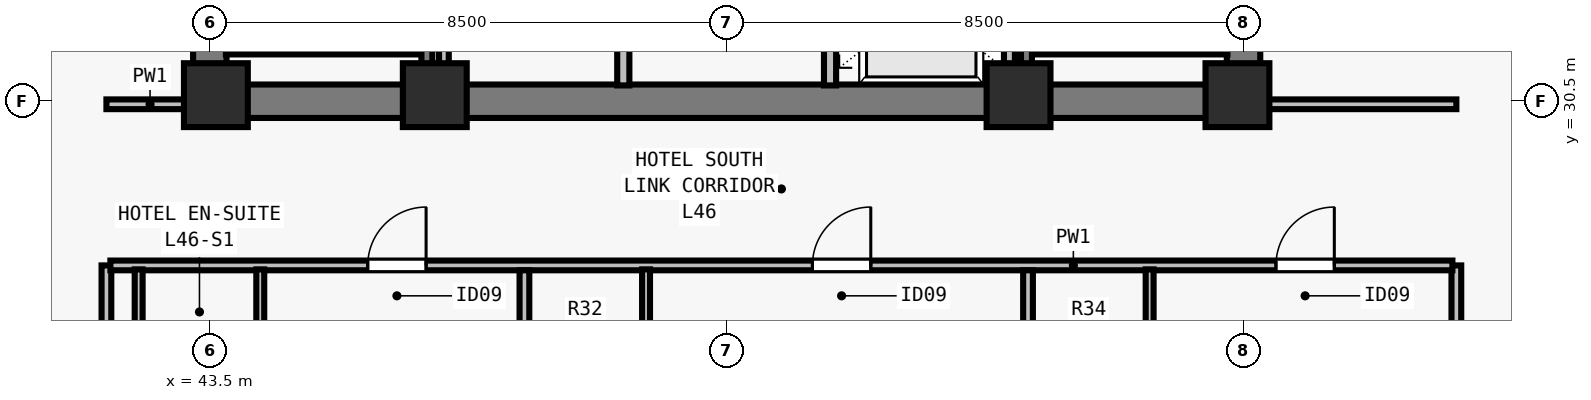
"""IFC4 building model, lengths in metres.
Left out: names, types, materials, properties, quantities, classifications, styles, units other than length and angle.
Written with IfcOpenShell. Run it as: python <this file> out.ifc"""

import sys

from ifc_helpers import new_model, si_unit, direction, frame, frame_2d, origin, origin_2d, place, context, subcontext, project, spatial, rectangle, extrude, element, fill, save


model = new_model("IFC4")
c1 = context("Model", 3, precision=1e-05, world=origin(), true_north=direction((0.0, 1.0)))
c2 = subcontext(c1, "Body", "Model", "MODEL_VIEW")
j1 = project(units=[si_unit("LENGTHUNIT", "METRE"), si_unit("PLANEANGLEUNIT", "RADIAN")], contexts=[c1])
p1 = place(None, origin())
s1 = spatial("IfcSite", under=j1, at=p1, CompositionType="ELEMENT")
p2 = place(p1, origin())
s2 = spatial("IfcBuilding", under=s1, at=p2, CompositionType="ELEMENT")
p3 = place(p2, frame((0.0, 0.0, 169.0)))
s3 = spatial("IfcBuildingStorey", under=s2, at=p3, CompositionType="ELEMENT", Elevation=169.0)
for number, where, z_axis, x_axis in (
    (1, (43.6, 30.6, 0.0), (0.0, 0.0, 1.0), (1.0, 0.0, 0.0)),
    (2, (47.2, 30.6, 0.0), (0.0, 0.0, 1.0), (1.0, 0.0, 0.0)),
    (3, (56.8, 30.6, 0.0), (0.0, 0.0, 1.0), (1.0, 0.0, 0.0)),
    (4, (60.4, 30.6, 0.0), (0.0, 0.0, 1.0), (1.0, 0.0, 0.0)),
):
    element("IfcColumn", number, at=place(p3, frame(where, z_axis=z_axis, x_axis=x_axis)), inside=s3, PredefinedType="COLUMN", context=c2, shape_type="SweptSolid", body=[
        extrude(rectangle(XDim=1.05, YDim=1.05, at=origin_2d()), origin(), (0.0, 0.0, 1.0), 3.5),
    ])
p4 = place(p3, frame((43.225, 30.5, 0.0), z_axis=(0.0, 0.0, 1.0), x_axis=(1.0, 0.0, 0.0)))
e5 = element("IfcWall", 5, at=p4, inside=s3, PredefinedType="SHEAR", context=c2, shape_type="SweptSolid", body=[
    extrude(rectangle(XDim=17.55, YDim=0.55, at=frame_2d((8.775, 0.0))), origin(), (0.0, 0.0, 1.0), 3.28),
])
for number, where, z_axis, x_axis in (
    (6, (43.5, 30.765, 0.0), (0.0, 0.0, 1.0), (0.0, 1.0, 0.0)),
    (7, (60.5, 30.765, 0.0), (0.0, 0.0, 1.0), (0.0, 1.0, 0.0)),
):
    element("IfcWall", number, at=place(p3, frame(where, z_axis=z_axis, x_axis=x_axis)), inside=s3, PredefinedType="SHEAR", context=c2, shape_type="SweptSolid", body=[
        extrude(rectangle(XDim=7.985, YDim=0.55, at=frame_2d((3.993, 0.0))), origin(), (0.0, 0.0, 1.0), 3.28),
    ])
p5 = place(p3, frame((50.3, 30.76, 0.0), z_axis=(0.0, 0.0, 1.0), x_axis=(0.0, 1.0, 0.0)))
e8 = element("IfcWall", 8, at=p5, inside=s3, PredefinedType="SOLIDWALL", context=c2, shape_type="SweptSolid", body=[
    extrude(rectangle(XDim=7.855, YDim=0.2, at=frame_2d((3.927, 0.0))), origin(), (0.0, 0.0, 1.0), 3.28),
])
p6 = place(p5, frame((1.34, 0.0, 0.0)))
e9 = element("IfcOpeningElement", 9, at=p6, cuts=e8, PredefinedType="OPENING", context=c2, shape_type="SweptSolid", body=[
    extrude(rectangle(XDim=0.9, YDim=2.12, at=frame_2d((0.45, 1.06))), frame((0.0, 0.11, 0.0), z_axis=(0.0, -1.0, 0.0), x_axis=(1.0, 0.0, 0.0)), (0.0, 0.0, 1.0), 0.22),
])
p7 = place(p5, frame((5.34, 0.0, 0.0)))
e10 = element("IfcOpeningElement", 10, at=p7, cuts=e8, PredefinedType="OPENING", context=c2, shape_type="SweptSolid", body=[
    extrude(rectangle(XDim=0.9, YDim=2.12, at=frame_2d((0.45, 1.06))), frame((0.0, 0.11, 0.0), z_axis=(0.0, -1.0, 0.0), x_axis=(1.0, 0.0, 0.0)), (0.0, 0.0, 1.0), 0.22),
])
p8 = place(p3, frame((53.7, 30.76, 0.0), z_axis=(0.0, 0.0, 1.0), x_axis=(0.0, 1.0, 0.0)))
e11 = element("IfcWall", 11, at=p8, inside=s3, PredefinedType="SOLIDWALL", context=c2, shape_type="SweptSolid", body=[
    extrude(rectangle(XDim=7.855, YDim=0.2, at=frame_2d((3.927, 0.0))), origin(), (0.0, 0.0, 1.0), 3.28),
])
p9 = place(p8, frame((0.79, 0.0, 0.0)))
e12 = element("IfcOpeningElement", 12, at=p9, cuts=e11, PredefinedType="OPENING", context=c2, shape_type="SweptSolid", body=[
    extrude(rectangle(XDim=1.1, YDim=2.2, at=frame_2d((0.55, 1.1))), frame((0.0, 0.11, 0.0), z_axis=(0.0, -1.0, 0.0), x_axis=(1.0, 0.0, 0.0)), (0.0, 0.0, 1.0), 0.22),
])
p10 = place(p8, frame((3.49, 0.0, 0.0)))
e13 = element("IfcOpeningElement", 13, at=p10, cuts=e11, PredefinedType="OPENING", context=c2, shape_type="SweptSolid", body=[
    extrude(rectangle(XDim=1.1, YDim=2.2, at=frame_2d((0.55, 1.1))), frame((0.0, 0.11, 0.0), z_axis=(0.0, -1.0, 0.0), x_axis=(1.0, 0.0, 0.0)), (0.0, 0.0, 1.0), 0.22),
])
p11 = place(p8, frame((6.19, 0.0, 0.0)))
e14 = element("IfcOpeningElement", 14, at=p11, cuts=e11, PredefinedType="OPENING", context=c2, shape_type="SweptSolid", body=[
    extrude(rectangle(XDim=1.1, YDim=2.2, at=frame_2d((0.55, 1.1))), frame((0.0, 0.11, 0.0), z_axis=(0.0, -1.0, 0.0), x_axis=(1.0, 0.0, 0.0)), (0.0, 0.0, 1.0), 0.22),
])
p12 = place(p3, frame((47.35, 30.76, 0.0), z_axis=(0.0, 0.0, 1.0), x_axis=(0.0, 1.0, 0.0)))
e15 = element("IfcWall", 15, at=p12, inside=s3, PredefinedType="PARTITIONING", context=c2, shape_type="SweptSolid", body=[
    extrude(rectangle(XDim=7.855, YDim=0.16, at=frame_2d((3.927, 0.0))), origin(), (0.0, 0.0, 1.0), 3.28),
])
p13 = place(p3, frame((56.65, 30.76, 0.0), z_axis=(0.0, 0.0, 1.0), x_axis=(0.0, 1.0, 0.0)))
e16 = element("IfcWall", 16, at=p13, inside=s3, PredefinedType="SOLIDWALL", context=c2, shape_type="SweptSolid", body=[
    extrude(rectangle(XDim=7.855, YDim=0.18, at=frame_2d((3.927, 0.0))), origin(), (0.0, 0.0, 1.0), 3.28),
])
p14 = place(p3, frame((41.8, 15.325, 0.0), z_axis=(0.0, 0.0, 1.0), x_axis=(0.0, 1.0, 0.0)))
e17 = element("IfcWall", 17, at=p14, inside=s3, PredefinedType="PARTITIONING", context=c2, shape_type="SweptSolid", body=[
    extrude(rectangle(XDim=12.475, YDim=0.16, at=frame_2d((6.238, 0.0))), origin(), (0.0, 0.0, 1.0), 3.28),
])
p15 = place(p3, frame((41.8, 30.45, 0.0), z_axis=(0.0, 0.0, 1.0), x_axis=(1.0, 0.0, 0.0)))
e18 = element("IfcWall", 18, at=p15, inside=s3, PredefinedType="PARTITIONING", context=c2, shape_type="SweptSolid", body=[
    extrude(rectangle(XDim=1.435, YDim=0.16, at=frame_2d((0.718, 0.0))), origin(), (0.0, 0.0, 1.0), 3.28),
])
p16 = place(p3, frame((64.0, 15.27, 0.0), z_axis=(0.0, 0.0, 1.0), x_axis=(0.0, 1.0, 0.0)))
e19 = element("IfcWall", 19, at=p16, inside=s3, PredefinedType="PARTITIONING", context=c2, shape_type="SweptSolid", body=[
    extrude(rectangle(XDim=12.53, YDim=0.16, at=frame_2d((6.265, 0.0))), origin(), (0.0, 0.0, 1.0), 2.555),
])
p17 = place(p3, frame((60.765, 30.45, 0.0), z_axis=(0.0, 0.0, 1.0), x_axis=(1.0, 0.0, 0.0)))
e20 = element("IfcWall", 20, at=p17, inside=s3, PredefinedType="PARTITIONING", context=c2, shape_type="SweptSolid", body=[
    extrude(rectangle(XDim=3.235, YDim=0.16, at=frame_2d((1.618, 0.0))), origin(), (0.0, 0.0, 1.0), 3.28),
])
p18 = place(p3, frame((41.865, 27.8, 0.0), z_axis=(0.0, 0.0, 1.0), x_axis=(1.0, 0.0, 0.0)))
e21 = element("IfcWall", 21, at=p18, inside=s3, PredefinedType="PARTITIONING", context=c2, shape_type="SweptSolid", body=[
    extrude(rectangle(XDim=22.07, YDim=0.16, at=frame_2d((11.035, 0.0))), origin(), (0.0, 0.0, 1.0), 3.28),
])
p19 = place(p18, frame((4.232, 0.0, 0.0)))
e22 = element("IfcOpeningElement", 22, at=p19, cuts=e21, PredefinedType="OPENING", context=c2, shape_type="SweptSolid", body=[
    extrude(rectangle(XDim=0.96, YDim=2.15, at=frame_2d((0.48, 1.075))), frame((0.0, 0.09, 0.0), z_axis=(0.0, -1.0, 0.0), x_axis=(1.0, 0.0, 0.0)), (0.0, 0.0, 1.0), 0.18),
])
p20 = place(p18, frame((11.545, 0.0, 0.0)))
e23 = element("IfcOpeningElement", 23, at=p20, cuts=e21, PredefinedType="OPENING", context=c2, shape_type="SweptSolid", body=[
    extrude(rectangle(XDim=0.96, YDim=2.15, at=frame_2d((0.48, 1.075))), frame((0.0, 0.09, 0.0), z_axis=(0.0, -1.0, 0.0), x_axis=(1.0, 0.0, 0.0)), (0.0, 0.0, 1.0), 0.18),
])
p21 = place(p18, frame((19.168, 0.0, 0.0)))
e24 = element("IfcOpeningElement", 24, at=p21, cuts=e21, PredefinedType="OPENING", context=c2, shape_type="SweptSolid", body=[
    extrude(rectangle(XDim=0.96, YDim=2.15, at=frame_2d((0.48, 1.075))), frame((0.0, 0.09, 0.0), z_axis=(0.0, -1.0, 0.0), x_axis=(1.0, 0.0, 0.0)), (0.0, 0.0, 1.0), 0.18),
])
for number, where, z_axis, x_axis in (
    (25, (42.33, 25.42, 0.0), (0.0, 0.0, 1.0), (0.0, 1.0, 0.0)),
    (26, (44.33, 25.42, 0.0), (0.0, 0.0, 1.0), (0.0, 1.0, 0.0)),
):
    element("IfcWall", number, at=place(p3, frame(where, z_axis=z_axis, x_axis=x_axis)), inside=s3, PredefinedType="PLUMBINGWALL", context=c2, shape_type="SweptSolid", body=[
        extrude(rectangle(XDim=2.315, YDim=0.13, at=frame_2d((1.158, 0.0))), origin(), (0.0, 0.0, 1.0), 3.28),
    ])
p22 = place(p3, frame((48.674, 15.325, 0.0), z_axis=(0.0, 0.0, 1.0), x_axis=(0.0, 1.0, 0.0)))
e27 = element("IfcWall", 27, at=p22, inside=s3, PredefinedType="PARTITIONING", context=c2, shape_type="SweptSolid", body=[
    extrude(rectangle(XDim=12.395, YDim=0.16, at=frame_2d((6.198, 0.0))), origin(), (0.0, 0.0, 1.0), 2.896),
])
p23 = place(p3, frame((50.674, 25.42, 0.0), z_axis=(0.0, 0.0, 1.0), x_axis=(0.0, 1.0, 0.0)))
e28 = element("IfcWall", 28, at=p23, inside=s3, PredefinedType="PLUMBINGWALL", context=c2, shape_type="SweptSolid", body=[
    extrude(rectangle(XDim=2.315, YDim=0.13, at=frame_2d((1.158, 0.0))), origin(), (0.0, 0.0, 1.0), 3.28),
])
p24 = place(p3, frame((56.956, 15.325, 0.0), z_axis=(0.0, 0.0, 1.0), x_axis=(0.0, 1.0, 0.0)))
e29 = element("IfcWall", 29, at=p24, inside=s3, PredefinedType="PARTITIONING", context=c2, shape_type="SweptSolid", body=[
    extrude(rectangle(XDim=12.395, YDim=0.16, at=frame_2d((6.198, 0.0))), origin(), (0.0, 0.0, 1.0), 2.555),
])
p25 = place(p3, frame((58.956, 25.42, 0.0), z_axis=(0.0, 0.0, 1.0), x_axis=(0.0, 1.0, 0.0)))
e30 = element("IfcWall", 30, at=p25, inside=s3, PredefinedType="PLUMBINGWALL", context=c2, shape_type="SweptSolid", body=[
    extrude(rectangle(XDim=2.315, YDim=0.13, at=frame_2d((1.158, 0.0))), origin(), (0.0, 0.0, 1.0), 3.28),
])
p26 = place(p3, frame((43.765, 31.36, 0.0), z_axis=(0.0, 0.0, 1.0), x_axis=(1.0, 0.0, 0.0)))
e31 = element("IfcWall", 31, at=p26, inside=s3, PredefinedType="SOLIDWALL", context=c2, shape_type="SweptSolid", body=[
    extrude(rectangle(XDim=3.23, YDim=0.18, at=frame_2d((1.615, 0.0))), origin(), (0.0, 0.0, 1.0), 3.28),
])
p27 = place(p3, frame((47.07, 38.78, 0.0), z_axis=(0.0, 0.0, 1.0), x_axis=(0.0, -1.0, 0.0)))
e32 = element("IfcWall", 32, at=p27, inside=s3, PredefinedType="SOLIDWALL", context=c2, shape_type="SweptSolid", body=[
    extrude(rectangle(XDim=8.017, YDim=0.18, at=frame_2d((4.009, 0.0))), origin(), (0.0, 0.0, 1.0), 3.28),
])
p28 = place(p3, frame((57.005, 31.36, 0.0), z_axis=(0.0, 0.0, 1.0), x_axis=(1.0, 0.0, 0.0)))
e33 = element("IfcWall", 33, at=p28, inside=s3, PredefinedType="SOLIDWALL", context=c2, shape_type="SweptSolid", body=[
    extrude(rectangle(XDim=3.23, YDim=0.18, at=frame_2d((1.615, 0.0))), origin(), (0.0, 0.0, 1.0), 3.28),
])
p29 = place(p3, frame((56.93, 38.78, 0.0), z_axis=(0.0, 0.0, 1.0), x_axis=(0.0, -1.0, 0.0)))
e34 = element("IfcWall", 34, at=p29, inside=s3, PredefinedType="SOLIDWALL", context=c2, shape_type="SweptSolid", body=[
    extrude(rectangle(XDim=8.017, YDim=0.18, at=frame_2d((4.009, 0.0))), origin(), (0.0, 0.0, 1.0), 3.28),
])
p30 = place(p19, origin())
e35 = element("IfcDoor", 35, at=p30, inside=s3, OperationType="SINGLE_SWING_RIGHT", PredefinedType="DOOR", context=c2, shape_type="SweptSolid", body=[
    extrude(rectangle(XDim=0.96, YDim=2.15, at=frame_2d((0.48, 1.075))), frame((0.0, 0.025, 0.0), z_axis=(0.0, -1.0, 0.0), x_axis=(1.0, 0.0, 0.0)), (0.0, 0.0, 1.0), 0.05),
])
fill(e22, e35)
p31 = place(p20, origin())
e36 = element("IfcDoor", 36, at=p31, inside=s3, OperationType="SINGLE_SWING_RIGHT", PredefinedType="DOOR", context=c2, shape_type="SweptSolid", body=[
    extrude(rectangle(XDim=0.96, YDim=2.15, at=frame_2d((0.48, 1.075))), frame((0.0, 0.025, 0.0), z_axis=(0.0, -1.0, 0.0), x_axis=(1.0, 0.0, 0.0)), (0.0, 0.0, 1.0), 0.05),
])
fill(e23, e36)
p32 = place(p21, origin())
e37 = element("IfcDoor", 37, at=p32, inside=s3, OperationType="SINGLE_SWING_RIGHT", PredefinedType="DOOR", context=c2, shape_type="SweptSolid", body=[
    extrude(rectangle(XDim=0.96, YDim=2.15, at=frame_2d((0.48, 1.075))), frame((0.0, 0.025, 0.0), z_axis=(0.0, -1.0, 0.0), x_axis=(1.0, 0.0, 0.0)), (0.0, 0.0, 1.0), 0.05),
])
fill(e24, e37)
save(model, sys.argv[1])
